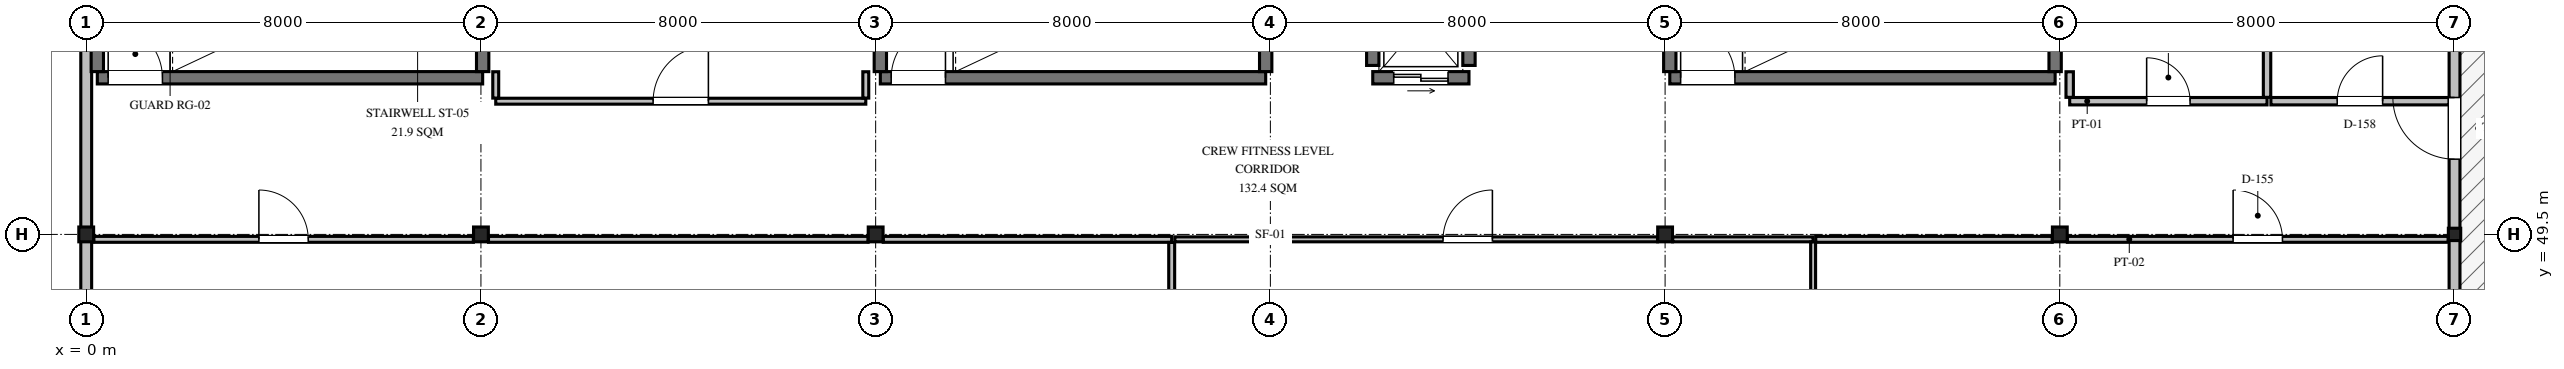
"""IFC4 building model, lengths in metres.
Left out: names, types, materials, properties, quantities, classifications, styles, units other than length and angle.
Written with IfcOpenShell. Run it as: python <this file> out.ifc"""

import sys

from ifc_helpers import new_model, si_unit, direction, frame, frame_2d, origin, origin_2d, place, context, subcontext, project, spatial, rectangle, i_section, extrude, element, fill, save


model = new_model("IFC4")
c1 = context("Model", 3, precision=1e-05, world=origin(), true_north=direction((0.0, 1.0)))
c2 = subcontext(c1, "Body", "Model", "MODEL_VIEW")
j1 = project(units=[si_unit("LENGTHUNIT", "METRE"), si_unit("PLANEANGLEUNIT", "RADIAN")], contexts=[c1])
p1 = place(None, origin())
s1 = spatial("IfcSite", under=j1, at=p1, CompositionType="ELEMENT")
p2 = place(p1, origin())
s2 = spatial("IfcBuilding", under=s1, at=p2, CompositionType="ELEMENT")
p3 = place(p2, frame((0.0, 0.0, 10.05)))
s3 = spatial("IfcBuildingStorey", under=s2, at=p3, CompositionType="ELEMENT", Elevation=10.05)
for number, where, z_axis, x_axis in (
    (1, (0.0, 49.5, 0.0), (0.0, 0.0, 1.0), (1.0, 0.0, 0.0)),
    (2, (8.0, 49.5, 0.0), (0.0, 0.0, 1.0), (1.0, 0.0, 0.0)),
    (3, (16.0, 49.5, 0.0), (0.0, 0.0, 1.0), (1.0, 0.0, 0.0)),
    (4, (24.0, 49.5, 0.0), (0.0, 0.0, 1.0), (1.0, 0.0, 0.0)),
    (5, (32.0, 49.5, 0.0), (0.0, 0.0, 1.0), (1.0, 0.0, 0.0)),
    (6, (40.0, 49.5, 0.0), (0.0, 0.0, 1.0), (1.0, 0.0, 0.0)),
):
    element("IfcColumn", number, at=place(p3, frame(where, z_axis=z_axis, x_axis=x_axis)), inside=s3, PredefinedType="COLUMN", context=c2, shape_type="SweptSolid", body=[
        extrude(i_section(OverallWidth=0.3, OverallDepth=0.3, WebThickness=0.01, FlangeThickness=0.015, FilletRadius=0.018, at=origin_2d()), origin(), (0.0, 0.0, 1.0), 4.2),
    ])
p4 = place(p3, frame((48.0, 49.5, 0.0), z_axis=(0.0, 0.0, 1.0), x_axis=(1.0, 0.0, 0.0)))
e7 = element("IfcColumn", 7, at=p4, inside=s3, PredefinedType="COLUMN", context=c2, shape_type="SweptSolid", body=[
    extrude(i_section(OverallWidth=0.25, OverallDepth=0.25, WebThickness=0.009, FlangeThickness=0.014, FilletRadius=0.016, at=origin_2d()), origin(), (0.0, 0.0, 1.0), 4.2),
])
p5 = place(p3, frame((0.0, 42.65, 0.0), z_axis=(0.0, 0.0, 1.0), x_axis=(0.0, 1.0, 0.0)))
e8 = element("IfcWall", 8, at=p5, inside=s3, PredefinedType="SOLIDWALL", context=c2, shape_type="SweptSolid", body=[
    extrude(rectangle(XDim=13.7, YDim=0.22, at=frame_2d((6.85, 0.0))), origin(), (0.0, 0.0, 1.0), 3.474),
])
p6 = place(p5, frame((2.5, 0.0, 1.0)))
e9 = element("IfcOpeningElement", 9, at=p6, cuts=e8, PredefinedType="OPENING", context=c2, shape_type="SweptSolid", body=[
    extrude(rectangle(XDim=1.8, YDim=1.8, at=frame_2d((0.9, 0.9))), frame((0.0, 0.12, 0.0), z_axis=(0.0, -1.0, 0.0), x_axis=(1.0, 0.0, 0.0)), (0.0, 0.0, 1.0), 0.24),
])
p7 = place(p3, frame((48.0, 42.625, 0.0), z_axis=(0.0, 0.0, 1.0), x_axis=(0.0, 1.0, 0.0)))
e10 = element("IfcWall", 10, at=p7, inside=s3, PredefinedType="SOLIDWALL", context=c2, shape_type="SweptSolid", body=[
    extrude(rectangle(XDim=13.75, YDim=0.22, at=frame_2d((6.875, 0.0))), origin(), (0.0, 0.0, 1.0), 3.374),
])
p8 = place(p7, frame((8.4, 0.0, 0.0)))
e11 = element("IfcOpeningElement", 11, at=p8, cuts=e10, PredefinedType="OPENING", context=c2, shape_type="SweptSolid", body=[
    extrude(rectangle(XDim=1.25, YDim=2.25, at=frame_2d((0.625, 1.125))), frame((0.0, 0.12, 0.0), z_axis=(0.0, -1.0, 0.0), x_axis=(1.0, 0.0, 0.0)), (0.0, 0.0, 1.0), 0.24),
])
p9 = place(p7, frame((2.5, 0.0, 1.0)))
e12 = element("IfcOpeningElement", 12, at=p9, cuts=e10, PredefinedType="OPENING", context=c2, shape_type="SweptSolid", body=[
    extrude(rectangle(XDim=2.35, YDim=1.3, at=frame_2d((1.175, 0.65))), frame((0.0, 0.12, 0.0), z_axis=(0.0, -1.0, 0.0), x_axis=(1.0, 0.0, 0.0)), (0.0, 0.0, 1.0), 0.24),
])
p10 = place(p3, frame((0.225, 52.675, 0.0), z_axis=(0.0, 0.0, 1.0), x_axis=(1.0, 0.0, 0.0)))
e13 = element("IfcWall", 13, at=p10, inside=s3, PredefinedType="SHEAR", context=c2, shape_type="SweptSolid", body=[
    extrude(rectangle(XDim=7.81, YDim=0.25, at=frame_2d((3.905, 0.0))), origin(), (0.0, 0.0, 1.0), 3.98),
])
p11 = place(p10, frame((0.22, 0.0, 0.0)))
e14 = element("IfcOpeningElement", 14, at=p11, cuts=e13, PredefinedType="OPENING", context=c2, shape_type="SweptSolid", body=[
    extrude(rectangle(XDim=1.1, YDim=2.15, at=frame_2d((0.55, 1.075))), frame((0.0, 0.135, 0.0), z_axis=(0.0, -1.0, 0.0), x_axis=(1.0, 0.0, 0.0)), (0.0, 0.0, 1.0), 0.27),
])
for number, where, z_axis, x_axis in (
    (15, (0.225, 52.8, 0.0), (0.0, 0.0, 1.0), (0.0, 1.0, 0.0)),
    (16, (8.035, 52.8, 0.0), (0.0, 0.0, 1.0), (0.0, 1.0, 0.0)),
):
    element("IfcWall", number, at=place(p3, frame(where, z_axis=z_axis, x_axis=x_axis)), inside=s3, PredefinedType="SHEAR", context=c2, shape_type="SweptSolid", body=[
        extrude(rectangle(XDim=2.9, YDim=0.25, at=frame_2d((1.45, 0.0))), origin(), (0.0, 0.0, 1.0), 3.98),
    ])
p12 = place(p3, frame((16.095, 52.675, 0.0), z_axis=(0.0, 0.0, 1.0), x_axis=(1.0, 0.0, 0.0)))
e17 = element("IfcWall", 17, at=p12, inside=s3, PredefinedType="SHEAR", context=c2, shape_type="SweptSolid", body=[
    extrude(rectangle(XDim=7.81, YDim=0.25, at=frame_2d((3.905, 0.0))), origin(), (0.0, 0.0, 1.0), 3.98),
])
p13 = place(p12, frame((0.22, 0.0, 0.0)))
e18 = element("IfcOpeningElement", 18, at=p13, cuts=e17, PredefinedType="OPENING", context=c2, shape_type="SweptSolid", body=[
    extrude(rectangle(XDim=1.1, YDim=2.15, at=frame_2d((0.55, 1.075))), frame((0.0, 0.135, 0.0), z_axis=(0.0, -1.0, 0.0), x_axis=(1.0, 0.0, 0.0)), (0.0, 0.0, 1.0), 0.27),
])
for number, where, z_axis, x_axis in (
    (19, (16.095, 52.8, 0.0), (0.0, 0.0, 1.0), (0.0, 1.0, 0.0)),
    (20, (23.905, 52.8, 0.0), (0.0, 0.0, 1.0), (0.0, 1.0, 0.0)),
):
    element("IfcWall", number, at=place(p3, frame(where, z_axis=z_axis, x_axis=x_axis)), inside=s3, PredefinedType="SHEAR", context=c2, shape_type="SweptSolid", body=[
        extrude(rectangle(XDim=2.9, YDim=0.25, at=frame_2d((1.45, 0.0))), origin(), (0.0, 0.0, 1.0), 3.98),
    ])
p14 = place(p3, frame((32.095, 52.675, 0.0), z_axis=(0.0, 0.0, 1.0), x_axis=(1.0, 0.0, 0.0)))
e21 = element("IfcWall", 21, at=p14, inside=s3, PredefinedType="SHEAR", context=c2, shape_type="SweptSolid", body=[
    extrude(rectangle(XDim=7.81, YDim=0.25, at=frame_2d((3.905, 0.0))), origin(), (0.0, 0.0, 1.0), 3.98),
])
p15 = place(p14, frame((0.22, 0.0, 0.0)))
e22 = element("IfcOpeningElement", 22, at=p15, cuts=e21, PredefinedType="OPENING", context=c2, shape_type="SweptSolid", body=[
    extrude(rectangle(XDim=1.1, YDim=2.15, at=frame_2d((0.55, 1.075))), frame((0.0, 0.135, 0.0), z_axis=(0.0, -1.0, 0.0), x_axis=(1.0, 0.0, 0.0)), (0.0, 0.0, 1.0), 0.27),
])
for number, where, z_axis, x_axis in (
    (23, (32.095, 52.8, 0.0), (0.0, 0.0, 1.0), (0.0, 1.0, 0.0)),
    (24, (39.905, 52.8, 0.0), (0.0, 0.0, 1.0), (0.0, 1.0, 0.0)),
):
    element("IfcWall", number, at=place(p3, frame(where, z_axis=z_axis, x_axis=x_axis)), inside=s3, PredefinedType="SHEAR", context=c2, shape_type="SweptSolid", body=[
        extrude(rectangle(XDim=2.9, YDim=0.25, at=frame_2d((1.45, 0.0))), origin(), (0.0, 0.0, 1.0), 3.98),
    ])
p16 = place(p3, frame((26.075, 52.675, 0.0), z_axis=(0.0, 0.0, 1.0), x_axis=(1.0, 0.0, 0.0)))
e25 = element("IfcWall", 25, at=p16, inside=s3, PredefinedType="SHEAR", context=c2, shape_type="SweptSolid", body=[
    extrude(rectangle(XDim=1.95, YDim=0.25, at=frame_2d((0.975, 0.0))), origin(), (0.0, 0.0, 1.0), 3.98),
])
p17 = place(p16, frame((0.425, 0.0, 0.0)))
e26 = element("IfcOpeningElement", 26, at=p17, cuts=e25, PredefinedType="OPENING", context=c2, shape_type="SweptSolid", body=[
    extrude(rectangle(XDim=1.1, YDim=2.15, at=frame_2d((0.55, 1.075))), frame((0.0, 0.135, 0.0), z_axis=(0.0, -1.0, 0.0), x_axis=(1.0, 0.0, 0.0)), (0.0, 0.0, 1.0), 0.27),
])
for number, where, z_axis, x_axis in (
    (27, (26.075, 52.925, 0.0), (0.0, 0.0, 1.0), (0.0, 1.0, 0.0)),
    (28, (28.025, 52.925, 0.0), (0.0, 0.0, 1.0), (0.0, 1.0, 0.0)),
):
    element("IfcWall", number, at=place(p3, frame(where, z_axis=z_axis, x_axis=x_axis)), inside=s3, PredefinedType="SHEAR", context=c2, shape_type="SweptSolid", body=[
        extrude(rectangle(XDim=1.75, YDim=0.25, at=frame_2d((0.875, 0.0))), origin(), (0.0, 0.0, 1.0), 3.98),
    ])
p18 = place(p3, frame((0.153, 49.4, 0.0), z_axis=(0.0, 0.0, 1.0), x_axis=(1.0, 0.0, 0.0)))
e29 = element("IfcWall", 29, at=p18, inside=s3, PredefinedType="PARTITIONING", context=c2, shape_type="SweptSolid", body=[
    extrude(rectangle(XDim=7.694, YDim=0.12, at=frame_2d((3.847, 0.0))), origin(), (0.0, 0.0, 1.0), 3.634),
])
p19 = place(p18, frame((3.347, 0.0, 0.0)))
e30 = element("IfcOpeningElement", 30, at=p19, cuts=e29, PredefinedType="OPENING", context=c2, shape_type="SweptSolid", body=[
    extrude(rectangle(XDim=1.0, YDim=2.1, at=frame_2d((0.5, 1.05))), frame((0.0, 0.07, 0.0), z_axis=(0.0, -1.0, 0.0), x_axis=(1.0, 0.0, 0.0)), (0.0, 0.0, 1.0), 0.14),
])
p20 = place(p3, frame((8.153, 49.4, 0.0), z_axis=(0.0, 0.0, 1.0), x_axis=(1.0, 0.0, 0.0)))
e31 = element("IfcWall", 31, at=p20, inside=s3, PredefinedType="PARTITIONING", context=c2, shape_type="SweptSolid", body=[
    extrude(rectangle(XDim=7.694, YDim=0.12, at=frame_2d((3.847, 0.0))), origin(), (0.0, 0.0, 1.0), 3.274),
])
p21 = place(p3, frame((16.153, 49.4, 0.0), z_axis=(0.0, 0.0, 1.0), x_axis=(1.0, 0.0, 0.0)))
e32 = element("IfcWall", 32, at=p21, inside=s3, PredefinedType="PARTITIONING", context=c2, shape_type="SweptSolid", body=[
    extrude(rectangle(XDim=5.847, YDim=0.12, at=frame_2d((2.923, 0.0))), origin(), (0.0, 0.0, 1.0), 3.386),
])
p22 = place(p3, frame((22.0, 42.583, 0.0), z_axis=(0.0, 0.0, 1.0), x_axis=(0.0, 1.0, 0.0)))
e33 = element("IfcWall", 33, at=p22, inside=s3, PredefinedType="PARTITIONING", context=c2, shape_type="SweptSolid", body=[
    extrude(rectangle(XDim=6.754, YDim=0.12, at=frame_2d((3.377, 0.0))), origin(), (0.0, 0.0, 1.0), 3.98),
])
p23 = place(p3, frame((22.063, 49.4, 0.0), z_axis=(0.0, 0.0, 1.0), x_axis=(1.0, 0.0, 0.0)))
e34 = element("IfcWall", 34, at=p23, inside=s3, PredefinedType="PARTITIONING", context=c2, shape_type="SweptSolid", body=[
    extrude(rectangle(XDim=1.784, YDim=0.1, at=frame_2d((0.892, 0.0))), origin(), (0.0, 0.0, 1.0), 3.386),
])
p24 = place(p3, frame((24.153, 49.4, 0.0), z_axis=(0.0, 0.0, 1.0), x_axis=(1.0, 0.0, 0.0)))
e35 = element("IfcWall", 35, at=p24, inside=s3, PredefinedType="PARTITIONING", context=c2, shape_type="SweptSolid", body=[
    extrude(rectangle(XDim=7.694, YDim=0.1, at=frame_2d((3.847, 0.0))), origin(), (0.0, 0.0, 1.0), 3.324),
])
p25 = place(p24, frame((3.347, 0.0, 0.0)))
e36 = element("IfcOpeningElement", 36, at=p25, cuts=e35, PredefinedType="OPENING", context=c2, shape_type="SweptSolid", body=[
    extrude(rectangle(XDim=1.0, YDim=2.1, at=frame_2d((0.5, 1.05))), frame((0.0, 0.06, 0.0), z_axis=(0.0, -1.0, 0.0), x_axis=(1.0, 0.0, 0.0)), (0.0, 0.0, 1.0), 0.12),
])
p26 = place(p3, frame((32.153, 49.4, 0.0), z_axis=(0.0, 0.0, 1.0), x_axis=(1.0, 0.0, 0.0)))
e37 = element("IfcWall", 37, at=p26, inside=s3, PredefinedType="PARTITIONING", context=c2, shape_type="SweptSolid", body=[
    extrude(rectangle(XDim=2.847, YDim=0.1, at=frame_2d((1.423, 0.0))), origin(), (0.0, 0.0, 1.0), 3.374),
])
p27 = place(p3, frame((35.0, 42.583, 0.0), z_axis=(0.0, 0.0, 1.0), x_axis=(0.0, 1.0, 0.0)))
e38 = element("IfcWall", 38, at=p27, inside=s3, PredefinedType="PARTITIONING", context=c2, shape_type="SweptSolid", body=[
    extrude(rectangle(XDim=6.764, YDim=0.1, at=frame_2d((3.382, 0.0))), origin(), (0.0, 0.0, 1.0), 3.98),
])
p28 = place(p3, frame((35.053, 49.4, 0.0), z_axis=(0.0, 0.0, 1.0), x_axis=(1.0, 0.0, 0.0)))
e39 = element("IfcWall", 39, at=p28, inside=s3, PredefinedType="PARTITIONING", context=c2, shape_type="SweptSolid", body=[
    extrude(rectangle(XDim=4.794, YDim=0.12, at=frame_2d((2.397, 0.0))), origin(), (0.0, 0.0, 1.0), 3.374),
])
p29 = place(p3, frame((40.153, 49.4, 0.0), z_axis=(0.0, 0.0, 1.0), x_axis=(1.0, 0.0, 0.0)))
e40 = element("IfcWall", 40, at=p29, inside=s3, PredefinedType="PARTITIONING", context=c2, shape_type="SweptSolid", body=[
    extrude(rectangle(XDim=7.719, YDim=0.12, at=frame_2d((3.859, 0.0))), origin(), (0.0, 0.0, 1.0), 3.424),
])
p30 = place(p29, frame((3.36, 0.0, 0.0)))
e41 = element("IfcOpeningElement", 41, at=p30, cuts=e40, PredefinedType="OPENING", context=c2, shape_type="SweptSolid", body=[
    extrude(rectangle(XDim=1.0, YDim=2.1, at=frame_2d((0.5, 1.05))), frame((0.0, 0.07, 0.0), z_axis=(0.0, -1.0, 0.0), x_axis=(1.0, 0.0, 0.0)), (0.0, 0.0, 1.0), 0.14),
])
p31 = place(p3, frame((8.3, 52.2, 0.0), z_axis=(0.0, 0.0, 1.0), x_axis=(1.0, 0.0, 0.0)))
e42 = element("IfcWall", 42, at=p31, inside=s3, PredefinedType="PARTITIONING", context=c2, shape_type="SweptSolid", body=[
    extrude(rectangle(XDim=7.5, YDim=0.12, at=frame_2d((3.75, 0.0))), origin(), (0.0, 0.0, 1.0), 3.98),
])
p32 = place(p31, frame((3.19, 0.0, 0.0)))
e43 = element("IfcOpeningElement", 43, at=p32, cuts=e42, PredefinedType="OPENING", context=c2, shape_type="SweptSolid", body=[
    extrude(rectangle(XDim=1.12, YDim=2.1, at=frame_2d((0.56, 1.05))), frame((0.0, 0.07, 0.0), z_axis=(0.0, -1.0, 0.0), x_axis=(1.0, 0.0, 0.0)), (0.0, 0.0, 1.0), 0.14),
])
for number, where, z_axis, x_axis in (
    (44, (8.3, 52.263, 0.0), (0.0, 0.0, 1.0), (0.0, 1.0, 0.0)),
    (45, (15.8, 52.263, 0.0), (0.0, 0.0, 1.0), (0.0, 1.0, 0.0)),
):
    element("IfcWall", number, at=place(p3, frame(where, z_axis=z_axis, x_axis=x_axis)), inside=s3, PredefinedType="PARTITIONING", context=c2, shape_type="SweptSolid", body=[
        extrude(rectangle(XDim=0.534, YDim=0.12, at=frame_2d((0.267, 0.0))), origin(), (0.0, 0.0, 1.0), 3.98),
    ])
p33 = place(p3, frame((40.2, 52.2, 0.0), z_axis=(0.0, 0.0, 1.0), x_axis=(1.0, 0.0, 0.0)))
e46 = element("IfcWall", 46, at=p33, inside=s3, PredefinedType="PARTITIONING", context=c2, shape_type="SweptSolid", body=[
    extrude(rectangle(XDim=4.0, YDim=0.15, at=frame_2d((2.0, 0.0))), origin(), (0.0, 0.0, 1.0), 3.98),
])
p34 = place(p33, frame((1.56, 0.0, 0.0)))
e47 = element("IfcOpeningElement", 47, at=p34, cuts=e46, PredefinedType="OPENING", context=c2, shape_type="SweptSolid", body=[
    extrude(rectangle(XDim=0.88, YDim=2.1, at=frame_2d((0.44, 1.05))), frame((0.0, 0.085, 0.0), z_axis=(0.0, -1.0, 0.0), x_axis=(1.0, 0.0, 0.0)), (0.0, 0.0, 1.0), 0.17),
])
p35 = place(p3, frame((40.2, 52.278, 0.0), z_axis=(0.0, 0.0, 1.0), x_axis=(0.0, 1.0, 0.0)))
e48 = element("IfcWall", 48, at=p35, inside=s3, PredefinedType="PARTITIONING", context=c2, shape_type="SweptSolid", body=[
    extrude(rectangle(XDim=0.519, YDim=0.15, at=frame_2d((0.26, 0.0))), origin(), (0.0, 0.0, 1.0), 3.98),
])
p36 = place(p3, frame((44.2, 52.278, 0.0), z_axis=(0.0, 0.0, 1.0), x_axis=(0.0, 1.0, 0.0)))
e49 = element("IfcWall", 49, at=p36, inside=s3, PredefinedType="PARTITIONING", context=c2, shape_type="SweptSolid", body=[
    extrude(rectangle(XDim=4.139, YDim=0.15, at=frame_2d((2.069, 0.0))), origin(), (0.0, 0.0, 1.0), 3.574),
])
p37 = place(p3, frame((44.278, 52.2, 0.0), z_axis=(0.0, 0.0, 1.0), x_axis=(1.0, 0.0, 0.0)))
e50 = element("IfcWall", 50, at=p37, inside=s3, PredefinedType="PARTITIONING", context=c2, shape_type="SweptSolid", body=[
    extrude(rectangle(XDim=3.609, YDim=0.15, at=frame_2d((1.804, 0.0))), origin(), (0.0, 0.0, 1.0), 3.98),
])
p38 = place(p37, frame((1.344, 0.0, 0.0)))
e51 = element("IfcOpeningElement", 51, at=p38, cuts=e50, PredefinedType="OPENING", context=c2, shape_type="SweptSolid", body=[
    extrude(rectangle(XDim=0.92, YDim=2.1, at=frame_2d((0.46, 1.05))), frame((0.0, 0.085, 0.0), z_axis=(0.0, -1.0, 0.0), x_axis=(1.0, 0.0, 0.0)), (0.0, 0.0, 1.0), 0.17),
])
p39 = place(p8, frame((1.25, 0.0, 0.0), z_axis=(0.0, 0.0, 1.0), x_axis=(-1.0, 0.0, 0.0)))
e52 = element("IfcDoor", 52, at=p39, inside=s3, OperationType="SINGLE_SWING_RIGHT", PredefinedType="DOOR", context=c2, shape_type="SweptSolid", body=[
    extrude(rectangle(XDim=1.25, YDim=2.25, at=frame_2d((0.625, 1.125))), frame((0.0, 0.025, 0.0), z_axis=(0.0, -1.0, 0.0), x_axis=(1.0, 0.0, 0.0)), (0.0, 0.0, 1.0), 0.05),
])
fill(e11, e52)
p40 = place(p11, frame((1.1, 0.0, 0.0), z_axis=(0.0, 0.0, 1.0), x_axis=(-1.0, 0.0, 0.0)))
e53 = element("IfcDoor", 53, at=p40, inside=s3, OperationType="SINGLE_SWING_LEFT", PredefinedType="DOOR", context=c2, shape_type="SweptSolid", body=[
    extrude(rectangle(XDim=1.1, YDim=2.15, at=frame_2d((0.55, 1.075))), frame((0.0, 0.025, 0.0), z_axis=(0.0, -1.0, 0.0), x_axis=(1.0, 0.0, 0.0)), (0.0, 0.0, 1.0), 0.05),
])
fill(e14, e53)
p41 = place(p13, frame((1.1, 0.0, 0.0), z_axis=(0.0, 0.0, 1.0), x_axis=(-1.0, 0.0, 0.0)))
e54 = element("IfcDoor", 54, at=p41, inside=s3, OperationType="SINGLE_SWING_RIGHT", PredefinedType="DOOR", context=c2, shape_type="SweptSolid", body=[
    extrude(rectangle(XDim=1.1, YDim=2.15, at=frame_2d((0.55, 1.075))), frame((0.0, 0.025, 0.0), z_axis=(0.0, -1.0, 0.0), x_axis=(1.0, 0.0, 0.0)), (0.0, 0.0, 1.0), 0.05),
])
fill(e18, e54)
p42 = place(p15, frame((1.1, 0.0, 0.0), z_axis=(0.0, 0.0, 1.0), x_axis=(-1.0, 0.0, 0.0)))
e55 = element("IfcDoor", 55, at=p42, inside=s3, OperationType="SINGLE_SWING_LEFT", PredefinedType="DOOR", context=c2, shape_type="SweptSolid", body=[
    extrude(rectangle(XDim=1.1, YDim=2.15, at=frame_2d((0.55, 1.075))), frame((0.0, 0.025, 0.0), z_axis=(0.0, -1.0, 0.0), x_axis=(1.0, 0.0, 0.0)), (0.0, 0.0, 1.0), 0.05),
])
fill(e22, e55)
p43 = place(p17, origin())
e56 = element("IfcDoor", 56, at=p43, inside=s3, OperationType="DOUBLE_DOOR_SLIDING", PredefinedType="DOOR", context=c2, shape_type="SweptSolid", body=[
    extrude(rectangle(XDim=1.1, YDim=2.15, at=frame_2d((0.55, 1.075))), frame((0.0, 0.025, 0.0), z_axis=(0.0, -1.0, 0.0), x_axis=(1.0, 0.0, 0.0)), (0.0, 0.0, 1.0), 0.05),
])
fill(e26, e56)
p44 = place(p19, origin())
e57 = element("IfcDoor", 57, at=p44, inside=s3, OperationType="SINGLE_SWING_LEFT", PredefinedType="DOOR", context=c2, shape_type="SweptSolid", body=[
    extrude(rectangle(XDim=1.0, YDim=2.1, at=frame_2d((0.5, 1.05))), frame((0.0, 0.025, 0.0), z_axis=(0.0, -1.0, 0.0), x_axis=(1.0, 0.0, 0.0)), (0.0, 0.0, 1.0), 0.05),
])
fill(e30, e57)
p45 = place(p25, origin())
e58 = element("IfcDoor", 58, at=p45, inside=s3, OperationType="SINGLE_SWING_RIGHT", PredefinedType="DOOR", context=c2, shape_type="SweptSolid", body=[
    extrude(rectangle(XDim=1.0, YDim=2.1, at=frame_2d((0.5, 1.05))), frame((0.0, 0.025, 0.0), z_axis=(0.0, -1.0, 0.0), x_axis=(1.0, 0.0, 0.0)), (0.0, 0.0, 1.0), 0.05),
])
fill(e36, e58)
p46 = place(p30, origin())
e59 = element("IfcDoor", 59, at=p46, inside=s3, OperationType="SINGLE_SWING_LEFT", PredefinedType="DOOR", context=c2, shape_type="SweptSolid", body=[
    extrude(rectangle(XDim=1.0, YDim=2.1, at=frame_2d((0.5, 1.05))), frame((0.0, 0.025, 0.0), z_axis=(0.0, -1.0, 0.0), x_axis=(1.0, 0.0, 0.0)), (0.0, 0.0, 1.0), 0.05),
])
fill(e41, e59)
p47 = place(p32, origin())
e60 = element("IfcDoor", 60, at=p47, inside=s3, OperationType="SINGLE_SWING_RIGHT", PredefinedType="DOOR", context=c2, shape_type="SweptSolid", body=[
    extrude(rectangle(XDim=1.12, YDim=2.1, at=frame_2d((0.56, 1.05))), frame((0.0, 0.025, 0.0), z_axis=(0.0, -1.0, 0.0), x_axis=(1.0, 0.0, 0.0)), (0.0, 0.0, 1.0), 0.05),
])
fill(e43, e60)
p48 = place(p34, origin())
e61 = element("IfcDoor", 61, at=p48, inside=s3, OperationType="SINGLE_SWING_LEFT", PredefinedType="DOOR", context=c2, shape_type="SweptSolid", body=[
    extrude(rectangle(XDim=0.88, YDim=2.1, at=frame_2d((0.44, 1.05))), frame((0.0, 0.025, 0.0), z_axis=(0.0, -1.0, 0.0), x_axis=(1.0, 0.0, 0.0)), (0.0, 0.0, 1.0), 0.05),
])
fill(e47, e61)
p49 = place(p38, origin())
e62 = element("IfcDoor", 62, at=p49, inside=s3, OperationType="SINGLE_SWING_RIGHT", PredefinedType="DOOR", context=c2, shape_type="SweptSolid", body=[
    extrude(rectangle(XDim=0.92, YDim=2.1, at=frame_2d((0.46, 1.05))), frame((0.0, 0.025, 0.0), z_axis=(0.0, -1.0, 0.0), x_axis=(1.0, 0.0, 0.0)), (0.0, 0.0, 1.0), 0.05),
])
fill(e51, e62)
save(model, sys.argv[1])
